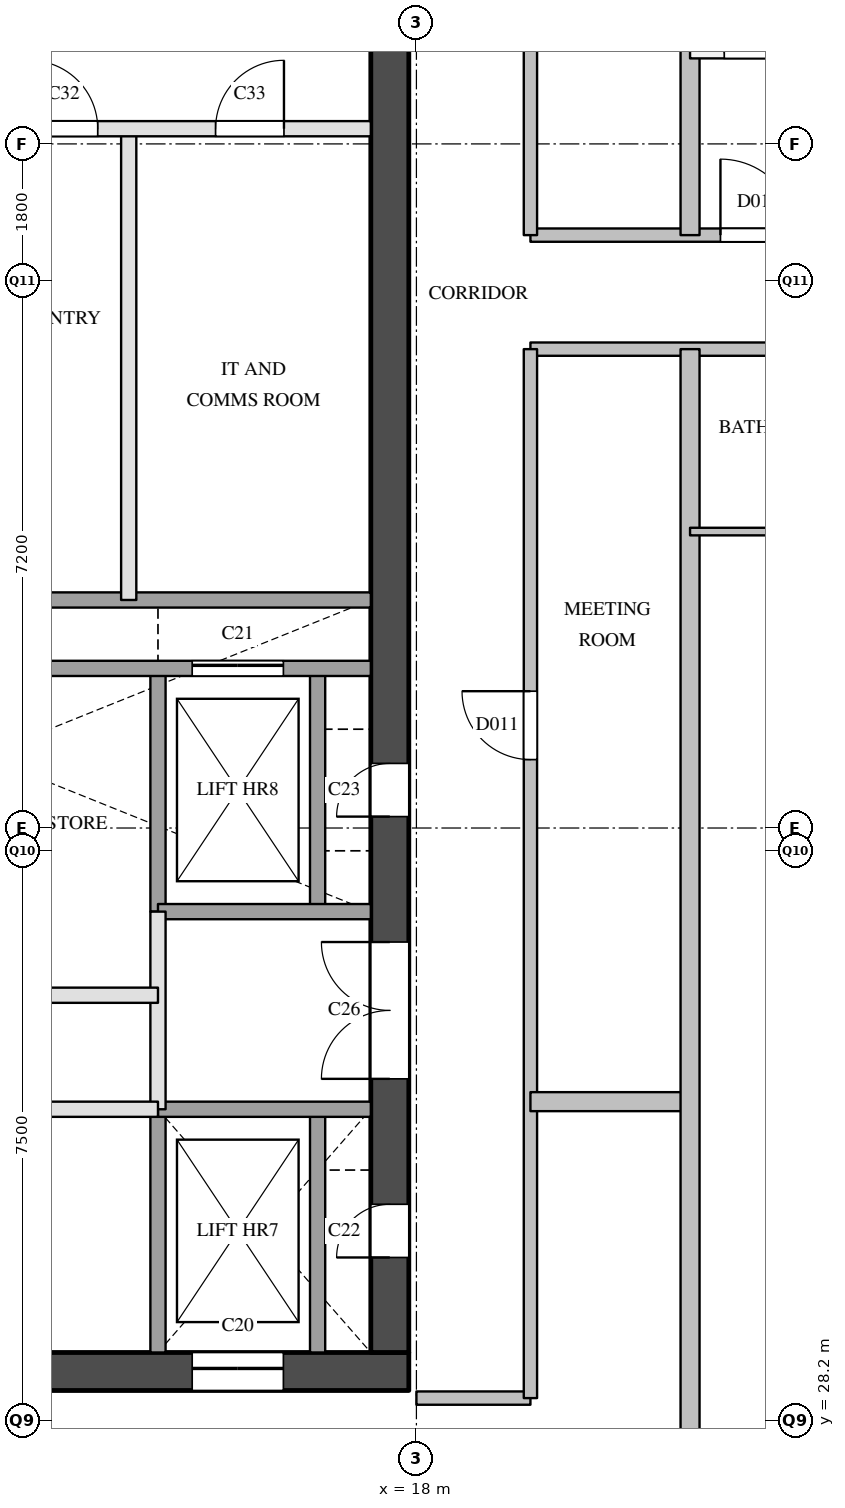
"""IFC4 building model, lengths in metres.
Left out: names, types, materials, properties, quantities, classifications, styles, units other than length and angle.
Written with IfcOpenShell. Run it as: python <this file> out.ifc"""

import sys

from ifc_helpers import new_model, si_unit, direction, frame, frame_2d, origin, place, context, subcontext, project, spatial, rectangle, extrude, element, fill, save


model = new_model("IFC4")
c1 = context("Model", 3, precision=1e-05, world=origin(), true_north=direction((0.0, 1.0)))
c2 = subcontext(c1, "Body", "Model", "MODEL_VIEW")
j1 = project(units=[si_unit("LENGTHUNIT", "METRE"), si_unit("PLANEANGLEUNIT", "RADIAN")], contexts=[c1])
p1 = place(None, origin())
s1 = spatial("IfcSite", under=j1, at=p1, CompositionType="ELEMENT")
p2 = place(p1, origin())
s2 = spatial("IfcBuilding", under=s1, at=p2, CompositionType="ELEMENT")
p3 = place(p2, frame((0.0, 0.0, 193.4)))
s3 = spatial("IfcBuildingStorey", under=s2, at=p3, CompositionType="ELEMENT", Elevation=193.4)
p4 = place(p3, frame((5.7, 28.85, 0.0), z_axis=(0.0, 0.0, 1.0), x_axis=(1.0, 0.0, 0.0)))
e1 = element("IfcWall", 1, at=p4, inside=s3, PredefinedType="SHEAR", context=c2, shape_type="SweptSolid", body=[
    extrude(rectangle(XDim=12.2, YDim=0.5, at=frame_2d((6.1, 0.0))), origin(), (0.0, 0.0, 1.0), 3.4),
])
p5 = place(p4, frame((9.35, 0.0, 0.0)))
e2 = element("IfcOpeningElement", 2, at=p5, cuts=e1, PredefinedType="OPENING", context=c2, shape_type="SweptSolid", body=[
    extrude(rectangle(XDim=1.2, YDim=2.1, at=frame_2d((0.6, 1.05))), frame((0.0, 0.26, 0.0), z_axis=(0.0, -1.0, 0.0), x_axis=(1.0, 0.0, 0.0)), (0.0, 0.0, 1.0), 0.52),
])
p6 = place(p3, frame((17.65, 29.1, 0.0), z_axis=(0.0, 0.0, 1.0), x_axis=(0.0, 1.0, 0.0)))
e3 = element("IfcWall", 3, at=p6, inside=s3, PredefinedType="SHEAR", context=c2, shape_type="SweptSolid", body=[
    extrude(rectangle(XDim=20.3, YDim=0.5, at=frame_2d((10.15, 0.0))), origin(), (0.0, 0.0, 1.0), 3.4),
])
p7 = place(p6, frame((1.25, 0.0, 0.0)))
e4 = element("IfcOpeningElement", 4, at=p7, cuts=e3, PredefinedType="OPENING", context=c2, shape_type="SweptSolid", body=[
    extrude(rectangle(XDim=0.7, YDim=2.1, at=frame_2d((0.35, 1.05))), frame((0.0, 0.26, 0.0), z_axis=(0.0, -1.0, 0.0), x_axis=(1.0, 0.0, 0.0)), (0.0, 0.0, 1.0), 0.52),
])
p8 = place(p6, frame((7.05, 0.0, 0.0)))
e5 = element("IfcOpeningElement", 5, at=p8, cuts=e3, PredefinedType="OPENING", context=c2, shape_type="SweptSolid", body=[
    extrude(rectangle(XDim=0.7, YDim=2.1, at=frame_2d((0.35, 1.05))), frame((0.0, 0.26, 0.0), z_axis=(0.0, -1.0, 0.0), x_axis=(1.0, 0.0, 0.0)), (0.0, 0.0, 1.0), 0.52),
])
p9 = place(p6, frame((3.6, 0.0, 0.0)))
e6 = element("IfcOpeningElement", 6, at=p9, cuts=e3, PredefinedType="OPENING", context=c2, shape_type="SweptSolid", body=[
    extrude(rectangle(XDim=1.8, YDim=2.1, at=frame_2d((0.9, 1.05))), frame((0.0, 0.26, 0.0), z_axis=(0.0, -1.0, 0.0), x_axis=(1.0, 0.0, 0.0)), (0.0, 0.0, 1.0), 0.52),
])
p10 = place(p3, frame((14.215, 39.0, 0.0), z_axis=(0.0, 0.0, 1.0), x_axis=(0.0, 1.0, 0.0)))
e7 = element("IfcWall", 7, at=p10, inside=s3, PredefinedType="PARTITIONING", context=c2, shape_type="SweptSolid", body=[
    extrude(rectangle(XDim=6.2, YDim=0.2, at=frame_2d((3.1, 0.0))), origin(), (0.0, 0.0, 1.0), 3.4),
])
p11 = place(p3, frame((14.6, 32.3, 0.0), z_axis=(0.0, 0.0, 1.0), x_axis=(0.0, 1.0, 0.0)))
e8 = element("IfcWall", 8, at=p11, inside=s3, PredefinedType="PARTITIONING", context=c2, shape_type="SweptSolid", body=[
    extrude(rectangle(XDim=2.6, YDim=0.2, at=frame_2d((1.3, 0.0))), origin(), (0.0, 0.0, 1.0), 3.4),
])
p12 = place(p3, frame((14.6, 29.1, 0.0), z_axis=(0.0, 0.0, 1.0), x_axis=(0.0, 1.0, 0.0)))
e9 = element("IfcWall", 9, at=p12, inside=s3, PredefinedType="SOLIDWALL", context=c2, shape_type="SweptSolid", body=[
    extrude(rectangle(XDim=3.2, YDim=0.2, at=frame_2d((1.6, 0.0))), origin(), (0.0, 0.0, 1.0), 3.4),
])
p13 = place(p3, frame((14.6, 34.9, 0.0), z_axis=(0.0, 0.0, 1.0), x_axis=(0.0, 1.0, 0.0)))
e10 = element("IfcWall", 10, at=p13, inside=s3, PredefinedType="SOLIDWALL", context=c2, shape_type="SweptSolid", body=[
    extrude(rectangle(XDim=3.2, YDim=0.2, at=frame_2d((1.6, 0.0))), origin(), (0.0, 0.0, 1.0), 3.4),
])
p14 = place(p3, frame((16.7, 29.1, 0.0), z_axis=(0.0, 0.0, 1.0), x_axis=(0.0, 1.0, 0.0)))
e11 = element("IfcWall", 11, at=p14, inside=s3, PredefinedType="SOLIDWALL", context=c2, shape_type="SweptSolid", body=[
    extrude(rectangle(XDim=3.2, YDim=0.2, at=frame_2d((1.6, 0.0))), origin(), (0.0, 0.0, 1.0), 3.4),
])
p15 = place(p3, frame((16.7, 34.9, 0.0), z_axis=(0.0, 0.0, 1.0), x_axis=(0.0, 1.0, 0.0)))
e12 = element("IfcWall", 12, at=p15, inside=s3, PredefinedType="SOLIDWALL", context=c2, shape_type="SweptSolid", body=[
    extrude(rectangle(XDim=3.2, YDim=0.2, at=frame_2d((1.6, 0.0))), origin(), (0.0, 0.0, 1.0), 3.4),
])
p16 = place(p3, frame((6.2, 32.3, 0.0), z_axis=(0.0, 0.0, 1.0), x_axis=(1.0, 0.0, 0.0)))
e13 = element("IfcWall", 13, at=p16, inside=s3, PredefinedType="PARTITIONING", context=c2, shape_type="SweptSolid", body=[
    extrude(rectangle(XDim=8.4, YDim=0.2, at=frame_2d((4.2, 0.0))), origin(), (0.0, 0.0, 1.0), 3.4),
])
p17 = place(p16, frame((1.86, 0.0, 0.0)))
e14 = element("IfcOpeningElement", 14, at=p17, cuts=e13, PredefinedType="OPENING", context=c2, shape_type="SweptSolid", body=[
    extrude(rectangle(XDim=0.9, YDim=2.1, at=frame_2d((0.45, 1.05))), frame((0.0, 0.11, 0.0), z_axis=(0.0, -1.0, 0.0), x_axis=(1.0, 0.0, 0.0)), (0.0, 0.0, 1.0), 0.22),
])
p18 = place(p16, frame((6.06, 0.0, 0.0)))
e15 = element("IfcOpeningElement", 15, at=p18, cuts=e13, PredefinedType="OPENING", context=c2, shape_type="SweptSolid", body=[
    extrude(rectangle(XDim=0.9, YDim=2.1, at=frame_2d((0.45, 1.05))), frame((0.0, 0.11, 0.0), z_axis=(0.0, -1.0, 0.0), x_axis=(1.0, 0.0, 0.0)), (0.0, 0.0, 1.0), 0.22),
])
p19 = place(p3, frame((14.6, 32.3, 0.0), z_axis=(0.0, 0.0, 1.0), x_axis=(1.0, 0.0, 0.0)))
e16 = element("IfcWall", 16, at=p19, inside=s3, PredefinedType="SOLIDWALL", context=c2, shape_type="SweptSolid", body=[
    extrude(rectangle(XDim=2.8, YDim=0.2, at=frame_2d((1.4, 0.0))), origin(), (0.0, 0.0, 1.0), 3.4),
])
p20 = place(p3, frame((6.2, 33.8, 0.0), z_axis=(0.0, 0.0, 1.0), x_axis=(1.0, 0.0, 0.0)))
e17 = element("IfcWall", 17, at=p20, inside=s3, PredefinedType="PARTITIONING", context=c2, shape_type="SweptSolid", body=[
    extrude(rectangle(XDim=8.4, YDim=0.2, at=frame_2d((4.2, 0.0))), origin(), (0.0, 0.0, 1.0), 3.4),
])
p21 = place(p20, frame((0.39, 0.0, 0.0)))
e18 = element("IfcOpeningElement", 18, at=p21, cuts=e17, PredefinedType="OPENING", context=c2, shape_type="SweptSolid", body=[
    extrude(rectangle(XDim=0.9, YDim=2.1, at=frame_2d((0.45, 1.05))), frame((0.0, 0.11, 0.0), z_axis=(0.0, -1.0, 0.0), x_axis=(1.0, 0.0, 0.0)), (0.0, 0.0, 1.0), 0.22),
])
p22 = place(p20, frame((4.59, 0.0, 0.0)))
e19 = element("IfcOpeningElement", 19, at=p22, cuts=e17, PredefinedType="OPENING", context=c2, shape_type="SweptSolid", body=[
    extrude(rectangle(XDim=0.9, YDim=2.1, at=frame_2d((0.45, 1.05))), frame((0.0, 0.11, 0.0), z_axis=(0.0, -1.0, 0.0), x_axis=(1.0, 0.0, 0.0)), (0.0, 0.0, 1.0), 0.22),
])
p23 = place(p3, frame((14.6, 34.9, 0.0), z_axis=(0.0, 0.0, 1.0), x_axis=(1.0, 0.0, 0.0)))
e20 = element("IfcWall", 20, at=p23, inside=s3, PredefinedType="SOLIDWALL", context=c2, shape_type="SweptSolid", body=[
    extrude(rectangle(XDim=2.8, YDim=0.2, at=frame_2d((1.4, 0.0))), origin(), (0.0, 0.0, 1.0), 3.4),
])
p24 = place(p3, frame((6.2, 38.1, 0.0), z_axis=(0.0, 0.0, 1.0), x_axis=(1.0, 0.0, 0.0)))
e21 = element("IfcWall", 21, at=p24, inside=s3, PredefinedType="SOLIDWALL", context=c2, shape_type="SweptSolid", body=[
    extrude(rectangle(XDim=11.2, YDim=0.2, at=frame_2d((5.6, 0.0))), origin(), (0.0, 0.0, 1.0), 3.4),
])
p25 = place(p24, frame((8.85, 0.0, 0.0)))
e22 = element("IfcOpeningElement", 22, at=p25, cuts=e21, PredefinedType="OPENING", context=c2, shape_type="SweptSolid", body=[
    extrude(rectangle(XDim=1.2, YDim=2.1, at=frame_2d((0.6, 1.05))), frame((0.0, 0.11, 0.0), z_axis=(0.0, -1.0, 0.0), x_axis=(1.0, 0.0, 0.0)), (0.0, 0.0, 1.0), 0.22),
])
p26 = place(p3, frame((12.5, 39.0, 0.0), z_axis=(0.0, 0.0, 1.0), x_axis=(1.0, 0.0, 0.0)))
e23 = element("IfcWall", 23, at=p26, inside=s3, PredefinedType="SOLIDWALL", context=c2, shape_type="SweptSolid", body=[
    extrude(rectangle(XDim=4.9, YDim=0.2, at=frame_2d((2.45, 0.0))), origin(), (0.0, 0.0, 1.0), 3.4),
])
p27 = place(p3, frame((12.5, 45.2, 0.0), z_axis=(0.0, 0.0, 1.0), x_axis=(1.0, 0.0, 0.0)))
e24 = element("IfcWall", 24, at=p27, inside=s3, PredefinedType="PARTITIONING", context=c2, shape_type="SweptSolid", body=[
    extrude(rectangle(XDim=4.9, YDim=0.2, at=frame_2d((2.45, 0.0))), origin(), (0.0, 0.0, 1.0), 3.4),
])
p28 = place(p27, frame((0.407, 0.0, 0.0)))
e25 = element("IfcOpeningElement", 25, at=p28, cuts=e24, PredefinedType="OPENING", context=c2, shape_type="SweptSolid", body=[
    extrude(rectangle(XDim=0.9, YDim=2.1, at=frame_2d((0.45, 1.05))), frame((0.0, 0.11, 0.0), z_axis=(0.0, -1.0, 0.0), x_axis=(1.0, 0.0, 0.0)), (0.0, 0.0, 1.0), 0.22),
])
p29 = place(p27, frame((2.857, 0.0, 0.0)))
e26 = element("IfcOpeningElement", 26, at=p29, cuts=e24, PredefinedType="OPENING", context=c2, shape_type="SweptSolid", body=[
    extrude(rectangle(XDim=0.9, YDim=2.1, at=frame_2d((0.45, 1.05))), frame((0.0, 0.11, 0.0), z_axis=(0.0, -1.0, 0.0), x_axis=(1.0, 0.0, 0.0)), (0.0, 0.0, 1.0), 0.22),
])
p30 = place(p3, frame((18.0, 28.5, 0.0), z_axis=(0.0, 0.0, 1.0), x_axis=(1.0, 0.0, 0.0)))
e27 = element("IfcWall", 27, at=p30, inside=s3, PredefinedType="PARTITIONING", context=c2, shape_type="SweptSolid", body=[
    extrude(rectangle(XDim=1.5, YDim=0.175, at=frame_2d((0.75, 0.0))), origin(), (0.0, 0.0, 1.0), 3.4),
])
p31 = place(p3, frame((19.5, 42.3, 0.0), z_axis=(0.0, 0.0, 1.0), x_axis=(1.0, 0.0, 0.0)))
e28 = element("IfcWall", 28, at=p31, inside=s3, PredefinedType="PARTITIONING", context=c2, shape_type="SweptSolid", body=[
    extrude(rectangle(XDim=15.0, YDim=0.175, at=frame_2d((7.5, 0.0))), origin(), (0.0, 0.0, 1.0), 2.4),
])
p32 = place(p31, frame((11.5, 0.0, 0.0)))
e29 = element("IfcOpeningElement", 29, at=p32, cuts=e28, PredefinedType="OPENING", context=c2, shape_type="SweptSolid", body=[
    extrude(rectangle(XDim=1.0, YDim=2.1, at=frame_2d((0.5, 1.05))), frame((0.0, 0.097, 0.0), z_axis=(0.0, -1.0, 0.0), x_axis=(1.0, 0.0, 0.0)), (0.0, 0.0, 1.0), 0.195),
])
p33 = place(p31, frame((6.1, 0.0, 0.0)))
e30 = element("IfcOpeningElement", 30, at=p33, cuts=e28, PredefinedType="OPENING", context=c2, shape_type="SweptSolid", body=[
    extrude(rectangle(XDim=1.0, YDim=2.1, at=frame_2d((0.5, 1.05))), frame((0.0, 0.097, 0.0), z_axis=(0.0, -1.0, 0.0), x_axis=(1.0, 0.0, 0.0)), (0.0, 0.0, 1.0), 0.195),
])
p34 = place(p3, frame((19.5, 43.8, 0.0), z_axis=(0.0, 0.0, 1.0), x_axis=(1.0, 0.0, 0.0)))
e31 = element("IfcWall", 31, at=p34, inside=s3, PredefinedType="PARTITIONING", context=c2, shape_type="SweptSolid", body=[
    extrude(rectangle(XDim=15.0, YDim=0.175, at=frame_2d((7.5, 0.0))), origin(), (0.0, 0.0, 1.0), 2.4),
])
p35 = place(p34, frame((2.5, 0.0, 0.0)))
e32 = element("IfcOpeningElement", 32, at=p35, cuts=e31, PredefinedType="OPENING", context=c2, shape_type="SweptSolid", body=[
    extrude(rectangle(XDim=1.0, YDim=2.1, at=frame_2d((0.5, 1.05))), frame((0.0, 0.097, 0.0), z_axis=(0.0, -1.0, 0.0), x_axis=(1.0, 0.0, 0.0)), (0.0, 0.0, 1.0), 0.195),
])
p36 = place(p34, frame((11.5, 0.0, 0.0)))
e33 = element("IfcOpeningElement", 33, at=p36, cuts=e31, PredefinedType="OPENING", context=c2, shape_type="SweptSolid", body=[
    extrude(rectangle(XDim=1.0, YDim=2.1, at=frame_2d((0.5, 1.05))), frame((0.0, 0.097, 0.0), z_axis=(0.0, -1.0, 0.0), x_axis=(1.0, 0.0, 0.0)), (0.0, 0.0, 1.0), 0.195),
])
p37 = place(p3, frame((19.5, 28.5, 0.0), z_axis=(0.0, 0.0, 1.0), x_axis=(0.0, 1.0, 0.0)))
e34 = element("IfcWall", 34, at=p37, inside=s3, PredefinedType="PARTITIONING", context=c2, shape_type="SweptSolid", body=[
    extrude(rectangle(XDim=13.8, YDim=0.175, at=frame_2d((6.9, 0.0))), origin(), (0.0, 0.0, 1.0), 3.4),
])
p38 = place(p37, frame((8.4, 0.0, 0.0)))
e35 = element("IfcOpeningElement", 35, at=p38, cuts=e34, PredefinedType="OPENING", context=c2, shape_type="SweptSolid", body=[
    extrude(rectangle(XDim=0.9, YDim=2.1, at=frame_2d((0.45, 1.05))), frame((0.0, 0.097, 0.0), z_axis=(0.0, -1.0, 0.0), x_axis=(1.0, 0.0, 0.0)), (0.0, 0.0, 1.0), 0.195),
])
p39 = place(p3, frame((19.5, 43.8, 0.0), z_axis=(0.0, 0.0, 1.0), x_axis=(0.0, 1.0, 0.0)))
e36 = element("IfcWall", 36, at=p39, inside=s3, PredefinedType="PARTITIONING", context=c2, shape_type="SweptSolid", body=[
    extrude(rectangle(XDim=7.7, YDim=0.175, at=frame_2d((3.85, 0.0))), origin(), (0.0, 0.0, 1.0), 3.4),
])
p40 = place(p39, frame((3.4, 0.0, 0.0)))
e37 = element("IfcOpeningElement", 37, at=p40, cuts=e36, PredefinedType="OPENING", context=c2, shape_type="SweptSolid", body=[
    extrude(rectangle(XDim=0.9, YDim=2.1, at=frame_2d((0.45, 1.05))), frame((0.0, 0.097, 0.0), z_axis=(0.0, -1.0, 0.0), x_axis=(1.0, 0.0, 0.0)), (0.0, 0.0, 1.0), 0.195),
])
p41 = place(p3, frame((21.6, 46.2, 0.0), z_axis=(0.0, 0.0, 1.0), x_axis=(1.0, 0.0, 0.0)))
e38 = element("IfcWall", 38, at=p41, inside=s3, PredefinedType="PARTITIONING", context=c2, shape_type="SweptSolid", body=[
    extrude(rectangle(XDim=1.8, YDim=0.15, at=frame_2d((0.9, 0.0))), origin(), (0.0, 0.0, 1.0), 3.4),
])
p42 = place(p41, frame((0.45, 0.0, 0.0)))
e39 = element("IfcOpeningElement", 39, at=p42, cuts=e38, PredefinedType="OPENING", context=c2, shape_type="SweptSolid", body=[
    extrude(rectangle(XDim=0.9, YDim=2.1, at=frame_2d((0.45, 1.05))), frame((0.0, 0.085, 0.0), z_axis=(0.0, -1.0, 0.0), x_axis=(1.0, 0.0, 0.0)), (0.0, 0.0, 1.0), 0.17),
])
p43 = place(p3, frame((19.5, 32.4, 0.0), z_axis=(0.0, 0.0, 1.0), x_axis=(1.0, 0.0, 0.0)))
e40 = element("IfcWall", 40, at=p43, inside=s3, PredefinedType="PARTITIONING", context=c2, shape_type="SweptSolid", body=[
    extrude(rectangle(XDim=2.1, YDim=0.25, at=frame_2d((1.05, 0.0))), origin(), (0.0, 0.0, 1.0), 3.4),
])
p44 = place(p3, frame((21.6, 27.0, 0.0), z_axis=(0.0, 0.0, 1.0), x_axis=(0.0, 1.0, 0.0)))
e41 = element("IfcWall", 41, at=p44, inside=s3, PredefinedType="PARTITIONING", context=c2, shape_type="SweptSolid", body=[
    extrude(rectangle(XDim=15.3, YDim=0.25, at=frame_2d((7.65, 0.0))), origin(), (0.0, 0.0, 1.0), 2.4),
])
p45 = place(p3, frame((21.6, 43.8, 0.0), z_axis=(0.0, 0.0, 1.0), x_axis=(0.0, 1.0, 0.0)))
e42 = element("IfcWall", 42, at=p45, inside=s3, PredefinedType="PARTITIONING", context=c2, shape_type="SweptSolid", body=[
    extrude(rectangle(XDim=10.2, YDim=0.25, at=frame_2d((5.1, 0.0))), origin(), (0.0, 0.0, 1.0), 2.4),
])
p46 = place(p3, frame((21.6, 39.9, 0.0), z_axis=(0.0, 0.0, 1.0), x_axis=(1.0, 0.0, 0.0)))
e43 = element("IfcWall", 43, at=p46, inside=s3, PredefinedType="PARTITIONING", context=c2, shape_type="SweptSolid", body=[
    extrude(rectangle(XDim=3.6, YDim=0.1, at=frame_2d((1.8, 0.0))), origin(), (0.0, 0.0, 1.0), 3.4),
])
p47 = place(p46, frame((1.4, 0.0, 0.0)))
e44 = element("IfcOpeningElement", 44, at=p47, cuts=e43, PredefinedType="OPENING", context=c2, shape_type="SweptSolid", body=[
    extrude(rectangle(XDim=0.8, YDim=2.1, at=frame_2d((0.4, 1.05))), frame((0.0, 0.06, 0.0), z_axis=(0.0, -1.0, 0.0), x_axis=(1.0, 0.0, 0.0)), (0.0, 0.0, 1.0), 0.12),
])
p48 = place(p5, origin())
e45 = element("IfcDoor", 45, at=p48, inside=s3, OperationType="SLIDING_TO_LEFT", PredefinedType="DOOR", context=c2, shape_type="SweptSolid", body=[
    extrude(rectangle(XDim=1.2, YDim=2.1, at=frame_2d((0.6, 1.05))), frame((0.0, 0.025, 0.0), z_axis=(0.0, -1.0, 0.0), x_axis=(1.0, 0.0, 0.0)), (0.0, 0.0, 1.0), 0.05),
])
fill(e2, e45)
p49 = place(p25, origin())
e46 = element("IfcDoor", 46, at=p49, inside=s3, OperationType="SLIDING_TO_LEFT", PredefinedType="DOOR", context=c2, shape_type="SweptSolid", body=[
    extrude(rectangle(XDim=1.2, YDim=2.1, at=frame_2d((0.6, 1.05))), frame((0.0, 0.025, 0.0), z_axis=(0.0, -1.0, 0.0), x_axis=(1.0, 0.0, 0.0)), (0.0, 0.0, 1.0), 0.05),
])
fill(e22, e46)
p50 = place(p7, origin())
e47 = element("IfcDoor", 47, at=p50, inside=s3, OperationType="SINGLE_SWING_LEFT", PredefinedType="DOOR", context=c2, shape_type="SweptSolid", body=[
    extrude(rectangle(XDim=0.7, YDim=2.1, at=frame_2d((0.35, 1.05))), frame((0.0, 0.025, 0.0), z_axis=(0.0, -1.0, 0.0), x_axis=(1.0, 0.0, 0.0)), (0.0, 0.0, 1.0), 0.05),
])
fill(e4, e47)
p51 = place(p8, origin())
e48 = element("IfcDoor", 48, at=p51, inside=s3, OperationType="SINGLE_SWING_LEFT", PredefinedType="DOOR", context=c2, shape_type="SweptSolid", body=[
    extrude(rectangle(XDim=0.7, YDim=2.1, at=frame_2d((0.35, 1.05))), frame((0.0, 0.025, 0.0), z_axis=(0.0, -1.0, 0.0), x_axis=(1.0, 0.0, 0.0)), (0.0, 0.0, 1.0), 0.05),
])
fill(e5, e48)
p52 = place(p9, origin())
e49 = element("IfcDoor", 49, at=p52, inside=s3, OperationType="DOUBLE_DOOR_SINGLE_SWING", PredefinedType="DOOR", context=c2, shape_type="SweptSolid", body=[
    extrude(rectangle(XDim=1.8, YDim=2.1, at=frame_2d((0.9, 1.05))), frame((0.0, 0.025, 0.0), z_axis=(0.0, -1.0, 0.0), x_axis=(1.0, 0.0, 0.0)), (0.0, 0.0, 1.0), 0.05),
])
fill(e6, e49)
p53 = place(p28, origin())
e50 = element("IfcDoor", 50, at=p53, inside=s3, OperationType="SINGLE_SWING_LEFT", PredefinedType="DOOR", context=c2, shape_type="SweptSolid", body=[
    extrude(rectangle(XDim=0.9, YDim=2.1, at=frame_2d((0.45, 1.05))), frame((0.0, 0.025, 0.0), z_axis=(0.0, -1.0, 0.0), x_axis=(1.0, 0.0, 0.0)), (0.0, 0.0, 1.0), 0.05),
])
fill(e25, e50)
p54 = place(p29, origin())
e51 = element("IfcDoor", 51, at=p54, inside=s3, OperationType="SINGLE_SWING_RIGHT", PredefinedType="DOOR", context=c2, shape_type="SweptSolid", body=[
    extrude(rectangle(XDim=0.9, YDim=2.1, at=frame_2d((0.45, 1.05))), frame((0.0, 0.025, 0.0), z_axis=(0.0, -1.0, 0.0), x_axis=(1.0, 0.0, 0.0)), (0.0, 0.0, 1.0), 0.05),
])
fill(e26, e51)
p55 = place(p38, origin())
e52 = element("IfcDoor", 52, at=p55, inside=s3, OperationType="SINGLE_SWING_RIGHT", PredefinedType="DOOR", context=c2, shape_type="SweptSolid", body=[
    extrude(rectangle(XDim=0.9, YDim=2.1, at=frame_2d((0.45, 1.05))), frame((0.0, 0.025, 0.0), z_axis=(0.0, -1.0, 0.0), x_axis=(1.0, 0.0, 0.0)), (0.0, 0.0, 1.0), 0.05),
])
fill(e35, e52)
p56 = place(p35, origin())
e53 = element("IfcDoor", 53, at=p56, inside=s3, OperationType="SINGLE_SWING_LEFT", PredefinedType="DOOR", context=c2, shape_type="SweptSolid", body=[
    extrude(rectangle(XDim=1.0, YDim=2.1, at=frame_2d((0.5, 1.05))), frame((0.0, 0.025, 0.0), z_axis=(0.0, -1.0, 0.0), x_axis=(1.0, 0.0, 0.0)), (0.0, 0.0, 1.0), 0.05),
])
fill(e32, e53)
p57 = place(p42, origin())
e54 = element("IfcDoor", 54, at=p57, inside=s3, OperationType="SINGLE_SWING_RIGHT", PredefinedType="DOOR", context=c2, shape_type="SweptSolid", body=[
    extrude(rectangle(XDim=0.9, YDim=2.1, at=frame_2d((0.45, 1.05))), frame((0.0, 0.025, 0.0), z_axis=(0.0, -1.0, 0.0), x_axis=(1.0, 0.0, 0.0)), (0.0, 0.0, 1.0), 0.05),
])
fill(e39, e54)
save(model, sys.argv[1])
